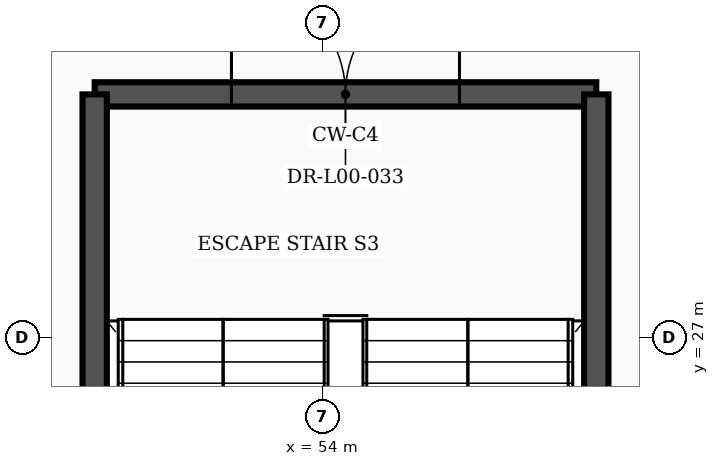
"""IFC4 building model, lengths in metres.
Left out: names, types, materials, properties, quantities, classifications, styles, units other than length and angle.
Written with IfcOpenShell. Run it as: python <this file> out.ifc"""

import sys

from ifc_helpers import new_model, si_unit, direction, frame, frame_2d, origin, place, context, subcontext, project, spatial, rectangle, extrude, element, fill, save


model = new_model("IFC4")
c1 = context("Model", 3, precision=1e-05, world=origin(), true_north=direction((0.0, 1.0)))
c2 = subcontext(c1, "Body", "Model", "MODEL_VIEW")
j1 = project(units=[si_unit("LENGTHUNIT", "METRE"), si_unit("PLANEANGLEUNIT", "RADIAN")], contexts=[c1])
p1 = place(None, origin())
s1 = spatial("IfcSite", under=j1, at=p1, CompositionType="ELEMENT")
p2 = place(p1, origin())
s2 = spatial("IfcBuilding", under=s1, at=p2, CompositionType="ELEMENT")
p3 = place(p2, origin())
s3 = spatial("IfcBuildingStorey", under=s2, at=p3, CompositionType="ELEMENT", Elevation=0.0)
p4 = place(p3, frame((51.0, 30.2, 0.0), z_axis=(0.0, 0.0, 1.0), x_axis=(1.0, 0.0, 0.0)))
e1 = element("IfcWall", 1, at=p4, inside=s3, PredefinedType="SHEAR", context=c2, shape_type="SweptSolid", body=[
    extrude(rectangle(XDim=6.6, YDim=0.32, at=frame_2d((3.3, 0.0))), origin(), (0.0, 0.0, 1.0), 5.75),
])
p5 = place(p4, frame((1.8, 0.0, 0.0)))
e2 = element("IfcOpeningElement", 2, at=p5, cuts=e1, PredefinedType="OPENING", context=c2, shape_type="SweptSolid", body=[
    extrude(rectangle(XDim=3.0, YDim=2.25, at=frame_2d((1.5, 1.125))), frame((0.0, 0.172, 0.0), z_axis=(0.0, -1.0, 0.0), x_axis=(1.0, 0.0, 0.0)), (0.0, 0.0, 1.0), 0.344),
])
for number, where, z_axis, x_axis in (
    (3, (51.0, 19.2, 0.0), (0.0, 0.0, 1.0), (0.0, 1.0, 0.0)),
    (4, (57.6, 19.2, 0.0), (0.0, 0.0, 1.0), (0.0, 1.0, 0.0)),
):
    element("IfcWall", number, at=place(p3, frame(where, z_axis=z_axis, x_axis=x_axis)), inside=s3, PredefinedType="SHEAR", context=c2, shape_type="SweptSolid", body=[
        extrude(rectangle(XDim=11.0, YDim=0.32, at=frame_2d((5.5, 0.0))), origin(), (0.0, 0.0, 1.0), 5.75),
    ])
p6 = place(p5, origin())
e5 = element("IfcDoor", 5, at=p6, inside=s3, OperationType="DOUBLE_DOOR_SINGLE_SWING", PredefinedType="DOOR", context=c2, shape_type="SweptSolid", body=[
    extrude(rectangle(XDim=3.0, YDim=2.25, at=frame_2d((1.5, 1.125))), frame((0.0, 0.025, 0.0), z_axis=(0.0, -1.0, 0.0), x_axis=(1.0, 0.0, 0.0)), (0.0, 0.0, 1.0), 0.05),
])
fill(e2, e5)
save(model, sys.argv[1])
